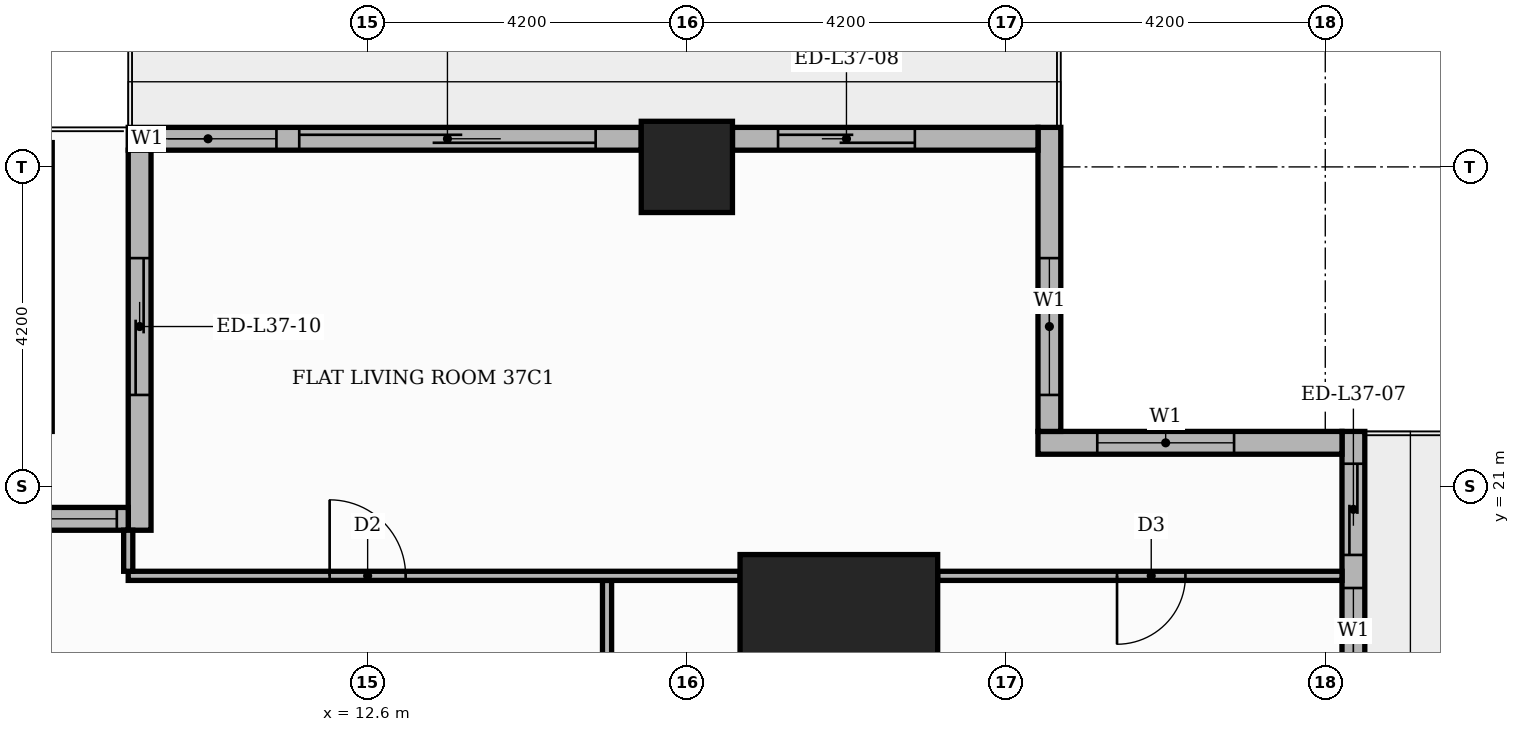
"""IFC4 building model, lengths in metres.
Left out: names, types, materials, properties, quantities, classifications, styles, units other than length and angle.
Written with IfcOpenShell. Run it as: python <this file> out.ifc"""

import sys

from ifc_helpers import new_model, si_unit, direction, frame, frame_2d, origin, origin_2d, place, context, subcontext, project, spatial, rectangle, extrude, element, fill, save


model = new_model("IFC4")
c1 = context("Model", 3, precision=1e-05, world=origin(), true_north=direction((0.0, 1.0)))
c2 = subcontext(c1, "Body", "Model", "MODEL_VIEW")
j1 = project(units=[si_unit("LENGTHUNIT", "METRE"), si_unit("PLANEANGLEUNIT", "RADIAN")], contexts=[c1])
p1 = place(None, origin())
s1 = spatial("IfcSite", under=j1, at=p1, CompositionType="ELEMENT")
p2 = place(p1, origin())
s2 = spatial("IfcBuilding", under=s1, at=p2, CompositionType="ELEMENT")
p3 = place(p2, frame((0.0, 0.0, 157.2)))
s3 = spatial("IfcBuildingStorey", under=s2, at=p3, CompositionType="ELEMENT", Elevation=157.2)
p4 = place(p3, frame((18.8, 18.8, 0.0), z_axis=(0.0, 0.0, 1.0), x_axis=(1.0, 0.0, 0.0)))
e1 = element("IfcColumn", 1, at=p4, inside=s3, PredefinedType="COLUMN", context=c2, shape_type="SweptSolid", body=[
    extrude(rectangle(XDim=2.6, YDim=2.6, at=origin_2d()), origin(), (0.0, 0.0, 1.0), 3.9),
])
p5 = place(p3, frame((16.8, 25.2, 0.0), z_axis=(0.0, 0.0, 1.0), x_axis=(1.0, 0.0, 0.0)))
e2 = element("IfcColumn", 2, at=p5, inside=s3, PredefinedType="COLUMN", context=c2, shape_type="SweptSolid", body=[
    extrude(rectangle(XDim=1.2, YDim=1.2, at=origin_2d()), origin(), (0.0, 0.0, 1.0), 3.9),
])
p6 = place(p3, frame((25.57, 17.4, 0.0), z_axis=(0.0, 0.0, 1.0), x_axis=(0.0, 1.0, 0.0)))
e3 = element("IfcWall", 3, at=p6, inside=s3, PredefinedType="STANDARD", context=c2, shape_type="SweptSolid", body=[
    extrude(rectangle(XDim=4.32, YDim=0.3, at=frame_2d((2.16, 0.0))), origin(), (0.0, 0.0, 1.0), 3.48),
])
p7 = place(p6, frame((2.695, 0.0, 0.0)))
e4 = element("IfcOpeningElement", 4, at=p7, cuts=e3, PredefinedType="OPENING", context=c2, shape_type="SweptSolid", body=[
    extrude(rectangle(XDim=1.2, YDim=2.4, at=frame_2d((0.6, 1.2))), frame((0.0, 0.16, 0.0), z_axis=(0.0, -1.0, 0.0), x_axis=(1.0, 0.0, 0.0)), (0.0, 0.0, 1.0), 0.32),
])
p8 = place(p6, frame((0.46, 0.0, 0.9)))
e5 = element("IfcOpeningElement", 5, at=p8, cuts=e3, PredefinedType="OPENING", context=c2, shape_type="SweptSolid", body=[
    extrude(rectangle(XDim=1.8, YDim=2.1, at=frame_2d((0.9, 1.05))), frame((0.0, 0.16, 0.0), z_axis=(0.0, -1.0, 0.0), x_axis=(1.0, 0.0, 0.0)), (0.0, 0.0, 1.0), 0.32),
])
p9 = place(p3, frame((25.42, 21.57, 0.0), z_axis=(0.0, 0.0, 1.0), x_axis=(-1.0, 0.0, 0.0)))
e6 = element("IfcWall", 6, at=p9, inside=s3, PredefinedType="STANDARD", context=c2, shape_type="SweptSolid", body=[
    extrude(rectangle(XDim=4.0, YDim=0.3, at=frame_2d((2.0, 0.0))), origin(), (0.0, 0.0, 1.0), 3.48),
])
p10 = place(p9, frame((1.42, 0.0, 0.9)))
e7 = element("IfcOpeningElement", 7, at=p10, cuts=e6, PredefinedType="OPENING", context=c2, shape_type="SweptSolid", body=[
    extrude(rectangle(XDim=1.8, YDim=2.1, at=frame_2d((0.9, 1.05))), frame((0.0, 0.16, 0.0), z_axis=(0.0, -1.0, 0.0), x_axis=(1.0, 0.0, 0.0)), (0.0, 0.0, 1.0), 0.32),
])
p11 = place(p3, frame((21.57, 21.72, 0.0), z_axis=(0.0, 0.0, 1.0), x_axis=(0.0, 1.0, 0.0)))
e8 = element("IfcWall", 8, at=p11, inside=s3, PredefinedType="STANDARD", context=c2, shape_type="SweptSolid", body=[
    extrude(rectangle(XDim=4.0, YDim=0.3, at=frame_2d((2.0, 0.0))), origin(), (0.0, 0.0, 1.0), 3.48),
])
p12 = place(p11, frame((0.48, 0.0, 0.9)))
e9 = element("IfcOpeningElement", 9, at=p12, cuts=e8, PredefinedType="OPENING", context=c2, shape_type="SweptSolid", body=[
    extrude(rectangle(XDim=1.8, YDim=2.1, at=frame_2d((0.9, 1.05))), frame((0.0, 0.16, 0.0), z_axis=(0.0, -1.0, 0.0), x_axis=(1.0, 0.0, 0.0)), (0.0, 0.0, 1.0), 0.32),
])
p13 = place(p3, frame((21.42, 25.57, 0.0), z_axis=(0.0, 0.0, 1.0), x_axis=(-1.0, 0.0, 0.0)))
e10 = element("IfcWall", 10, at=p13, inside=s3, PredefinedType="STANDARD", context=c2, shape_type="SweptSolid", body=[
    extrude(rectangle(XDim=4.02, YDim=0.3, at=frame_2d((2.01, 0.0))), origin(), (0.0, 0.0, 1.0), 3.48),
])
p14 = place(p13, frame((1.62, 0.0, 0.0)))
e11 = element("IfcOpeningElement", 11, at=p14, cuts=e10, PredefinedType="OPENING", context=c2, shape_type="SweptSolid", body=[
    extrude(rectangle(XDim=1.8, YDim=2.4, at=frame_2d((0.9, 1.2))), frame((0.0, 0.16, 0.0), z_axis=(0.0, -1.0, 0.0), x_axis=(1.0, 0.0, 0.0)), (0.0, 0.0, 1.0), 0.32),
])
p15 = place(p3, frame((16.2, 25.57, 0.0), z_axis=(0.0, 0.0, 1.0), x_axis=(-1.0, 0.0, 0.0)))
e12 = element("IfcWall", 12, at=p15, inside=s3, PredefinedType="STANDARD", context=c2, shape_type="SweptSolid", body=[
    extrude(rectangle(XDim=6.75, YDim=0.3, at=frame_2d((3.375, 0.0))), origin(), (0.0, 0.0, 1.0), 3.48),
])
p16 = place(p15, frame((0.6, 0.0, 0.0)))
e13 = element("IfcOpeningElement", 13, at=p16, cuts=e12, PredefinedType="OPENING", context=c2, shape_type="SweptSolid", body=[
    extrude(rectangle(XDim=3.9, YDim=2.4, at=frame_2d((1.95, 1.2))), frame((0.0, 0.16, 0.0), z_axis=(0.0, -1.0, 0.0), x_axis=(1.0, 0.0, 0.0)), (0.0, 0.0, 1.0), 0.32),
])
p17 = place(p15, frame((4.8, 0.0, 0.9)))
e14 = element("IfcOpeningElement", 14, at=p17, cuts=e12, PredefinedType="OPENING", context=c2, shape_type="SweptSolid", body=[
    extrude(rectangle(XDim=1.8, YDim=2.1, at=frame_2d((0.9, 1.05))), frame((0.0, 0.16, 0.0), z_axis=(0.0, -1.0, 0.0), x_axis=(1.0, 0.0, 0.0)), (0.0, 0.0, 1.0), 0.32),
])
p18 = place(p3, frame((9.6, 25.42, 0.0), z_axis=(0.0, 0.0, 1.0), x_axis=(0.0, -1.0, 0.0)))
e15 = element("IfcWall", 15, at=p18, inside=s3, PredefinedType="STANDARD", context=c2, shape_type="SweptSolid", body=[
    extrude(rectangle(XDim=5.0, YDim=0.3, at=frame_2d((2.5, 0.0))), origin(), (0.0, 0.0, 1.0), 3.48),
])
p19 = place(p18, frame((1.42, 0.0, 0.0)))
e16 = element("IfcOpeningElement", 16, at=p19, cuts=e15, PredefinedType="OPENING", context=c2, shape_type="SweptSolid", body=[
    extrude(rectangle(XDim=1.8, YDim=2.4, at=frame_2d((0.9, 1.2))), frame((0.0, 0.16, 0.0), z_axis=(0.0, -1.0, 0.0), x_axis=(1.0, 0.0, 0.0)), (0.0, 0.0, 1.0), 0.32),
])
p20 = place(p3, frame((9.45, 20.57, 0.0), z_axis=(0.0, 0.0, 1.0), x_axis=(-1.0, 0.0, 0.0)))
e17 = element("IfcWall", 17, at=p20, inside=s3, PredefinedType="STANDARD", context=c2, shape_type="SweptSolid", body=[
    extrude(rectangle(XDim=19.2, YDim=0.3, at=frame_2d((9.6, 0.0))), origin(), (0.0, 0.0, 1.0), 3.48),
])
p21 = place(p20, frame((0.15, 0.0, 0.9)))
e18 = element("IfcOpeningElement", 18, at=p21, cuts=e17, PredefinedType="OPENING", context=c2, shape_type="SweptSolid", body=[
    extrude(rectangle(XDim=3.9, YDim=2.1, at=frame_2d((1.95, 1.05))), frame((0.0, 0.16, 0.0), z_axis=(0.0, -1.0, 0.0), x_axis=(1.0, 0.0, 0.0)), (0.0, 0.0, 1.0), 0.32),
])
p22 = place(p20, frame((4.35, 0.0, 0.9)))
e19 = element("IfcOpeningElement", 19, at=p22, cuts=e17, PredefinedType="OPENING", context=c2, shape_type="SweptSolid", body=[
    extrude(rectangle(XDim=6.0, YDim=2.1, at=frame_2d((3.0, 1.05))), frame((0.0, 0.16, 0.0), z_axis=(0.0, -1.0, 0.0), x_axis=(1.0, 0.0, 0.0)), (0.0, 0.0, 1.0), 0.32),
])
p23 = place(p20, frame((10.65, 0.0, 0.9)))
e20 = element("IfcOpeningElement", 20, at=p23, cuts=e17, PredefinedType="OPENING", context=c2, shape_type="SweptSolid", body=[
    extrude(rectangle(XDim=6.0, YDim=2.1, at=frame_2d((3.0, 1.05))), frame((0.0, 0.16, 0.0), z_axis=(0.0, -1.0, 0.0), x_axis=(1.0, 0.0, 0.0)), (0.0, 0.0, 1.0), 0.32),
])
p24 = place(p20, frame((16.95, 0.0, 0.9)))
e21 = element("IfcOpeningElement", 21, at=p24, cuts=e17, PredefinedType="OPENING", context=c2, shape_type="SweptSolid", body=[
    extrude(rectangle(XDim=1.8, YDim=2.1, at=frame_2d((0.9, 1.05))), frame((0.0, 0.16, 0.0), z_axis=(0.0, -1.0, 0.0), x_axis=(1.0, 0.0, 0.0)), (0.0, 0.0, 1.0), 0.32),
])
p25 = place(p3, frame((15.75, 13.75, 0.0), z_axis=(0.0, 0.0, 1.0), x_axis=(0.0, 1.0, 0.0)))
e22 = element("IfcWall", 22, at=p25, inside=s3, PredefinedType="PARTITIONING", context=c2, shape_type="SweptSolid", body=[
    extrude(rectangle(XDim=6.01, YDim=0.12, at=frame_2d((3.005, 0.0))), origin(), (0.0, 0.0, 1.0), 3.48),
])
p26 = place(p25, frame((2.485, 0.0, 0.0)))
e23 = element("IfcOpeningElement", 23, at=p26, cuts=e22, PredefinedType="OPENING", context=c2, shape_type="SweptSolid", body=[
    extrude(rectangle(XDim=1.0, YDim=2.1, at=frame_2d((0.5, 1.05))), frame((0.0, 0.07, 0.0), z_axis=(0.0, -1.0, 0.0), x_axis=(1.0, 0.0, 0.0)), (0.0, 0.0, 1.0), 0.14),
])
p27 = place(p3, frame((9.45, 19.82, 0.0), z_axis=(0.0, 0.0, 1.0), x_axis=(1.0, 0.0, 0.0)))
e24 = element("IfcWall", 24, at=p27, inside=s3, PredefinedType="PARTITIONING", context=c2, shape_type="SweptSolid", body=[
    extrude(rectangle(XDim=8.05, YDim=0.12, at=frame_2d((4.025, 0.0))), origin(), (0.0, 0.0, 1.0), 3.48),
])
p28 = place(p27, frame((2.65, 0.0, 0.0)))
e25 = element("IfcOpeningElement", 25, at=p28, cuts=e24, PredefinedType="OPENING", context=c2, shape_type="SweptSolid", body=[
    extrude(rectangle(XDim=1.0, YDim=2.1, at=frame_2d((0.5, 1.05))), frame((0.0, 0.07, 0.0), z_axis=(0.0, -1.0, 0.0), x_axis=(1.0, 0.0, 0.0)), (0.0, 0.0, 1.0), 0.14),
])
p29 = place(p3, frame((20.1, 19.82, 0.0), z_axis=(0.0, 0.0, 1.0), x_axis=(1.0, 0.0, 0.0)))
e26 = element("IfcWall", 26, at=p29, inside=s3, PredefinedType="PARTITIONING", context=c2, shape_type="SweptSolid", body=[
    extrude(rectangle(XDim=5.32, YDim=0.12, at=frame_2d((2.66, 0.0))), origin(), (0.0, 0.0, 1.0), 3.48),
])
p30 = place(p29, frame((2.36, 0.0, 0.0)))
e27 = element("IfcOpeningElement", 27, at=p30, cuts=e26, PredefinedType="OPENING", context=c2, shape_type="SweptSolid", body=[
    extrude(rectangle(XDim=0.9, YDim=2.1, at=frame_2d((0.45, 1.05))), frame((0.0, 0.07, 0.0), z_axis=(0.0, -1.0, 0.0), x_axis=(1.0, 0.0, 0.0)), (0.0, 0.0, 1.0), 0.14),
])
p31 = place(p3, frame((9.45, 19.88, 0.0), z_axis=(0.0, 0.0, 1.0), x_axis=(0.0, 1.0, 0.0)))
e28 = element("IfcWall", 28, at=p31, inside=s3, PredefinedType="PARTITIONING", context=c2, shape_type="SweptSolid", body=[
    extrude(rectangle(XDim=0.54, YDim=0.12, at=frame_2d((0.27, 0.0))), origin(), (0.0, 0.0, 1.0), 3.48),
])
p32 = place(p7, origin())
e29 = element("IfcDoor", 29, at=p32, inside=s3, OperationType="SLIDING_TO_LEFT", PredefinedType="DOOR", context=c2, shape_type="SweptSolid", body=[
    extrude(rectangle(XDim=1.2, YDim=2.4, at=frame_2d((0.6, 1.2))), frame((0.0, 0.025, 0.0), z_axis=(0.0, -1.0, 0.0), x_axis=(1.0, 0.0, 0.0)), (0.0, 0.0, 1.0), 0.05),
])
fill(e4, e29)
p33 = place(p8, origin())
e30 = element("IfcWindow", 30, at=p33, inside=s3, PartitioningType="SINGLE_PANEL", PredefinedType="WINDOW", context=c2, shape_type="SweptSolid", body=[
    extrude(rectangle(XDim=1.8, YDim=2.1, at=frame_2d((0.9, 1.05))), frame((0.0, 0.03, 0.0), z_axis=(0.0, -1.0, 0.0), x_axis=(1.0, 0.0, 0.0)), (0.0, 0.0, 1.0), 0.06),
])
fill(e5, e30)
p34 = place(p10, origin())
e31 = element("IfcWindow", 31, at=p34, inside=s3, PartitioningType="SINGLE_PANEL", PredefinedType="WINDOW", context=c2, shape_type="SweptSolid", body=[
    extrude(rectangle(XDim=1.8, YDim=2.1, at=frame_2d((0.9, 1.05))), frame((0.0, 0.03, 0.0), z_axis=(0.0, -1.0, 0.0), x_axis=(1.0, 0.0, 0.0)), (0.0, 0.0, 1.0), 0.06),
])
fill(e7, e31)
p35 = place(p12, origin())
e32 = element("IfcWindow", 32, at=p35, inside=s3, PartitioningType="SINGLE_PANEL", PredefinedType="WINDOW", context=c2, shape_type="SweptSolid", body=[
    extrude(rectangle(XDim=1.8, YDim=2.1, at=frame_2d((0.9, 1.05))), frame((0.0, 0.03, 0.0), z_axis=(0.0, -1.0, 0.0), x_axis=(1.0, 0.0, 0.0)), (0.0, 0.0, 1.0), 0.06),
])
fill(e9, e32)
p36 = place(p14, origin())
e33 = element("IfcDoor", 33, at=p36, inside=s3, OperationType="SLIDING_TO_RIGHT", PredefinedType="DOOR", context=c2, shape_type="SweptSolid", body=[
    extrude(rectangle(XDim=1.8, YDim=2.4, at=frame_2d((0.9, 1.2))), frame((0.0, 0.025, 0.0), z_axis=(0.0, -1.0, 0.0), x_axis=(1.0, 0.0, 0.0)), (0.0, 0.0, 1.0), 0.05),
])
fill(e11, e33)
p37 = place(p16, origin())
e34 = element("IfcDoor", 34, at=p37, inside=s3, OperationType="SLIDING_TO_LEFT", PredefinedType="DOOR", context=c2, shape_type="SweptSolid", body=[
    extrude(rectangle(XDim=3.9, YDim=2.4, at=frame_2d((1.95, 1.2))), frame((0.0, 0.025, 0.0), z_axis=(0.0, -1.0, 0.0), x_axis=(1.0, 0.0, 0.0)), (0.0, 0.0, 1.0), 0.05),
])
fill(e13, e34)
p38 = place(p17, origin())
e35 = element("IfcWindow", 35, at=p38, inside=s3, PartitioningType="SINGLE_PANEL", PredefinedType="WINDOW", context=c2, shape_type="SweptSolid", body=[
    extrude(rectangle(XDim=1.8, YDim=2.1, at=frame_2d((0.9, 1.05))), frame((0.0, 0.03, 0.0), z_axis=(0.0, -1.0, 0.0), x_axis=(1.0, 0.0, 0.0)), (0.0, 0.0, 1.0), 0.06),
])
fill(e14, e35)
p39 = place(p19, origin())
e36 = element("IfcDoor", 36, at=p39, inside=s3, OperationType="SLIDING_TO_LEFT", PredefinedType="DOOR", context=c2, shape_type="SweptSolid", body=[
    extrude(rectangle(XDim=1.8, YDim=2.4, at=frame_2d((0.9, 1.2))), frame((0.0, 0.025, 0.0), z_axis=(0.0, -1.0, 0.0), x_axis=(1.0, 0.0, 0.0)), (0.0, 0.0, 1.0), 0.05),
])
fill(e16, e36)
p40 = place(p21, origin())
e37 = element("IfcWindow", 37, at=p40, inside=s3, PartitioningType="SINGLE_PANEL", PredefinedType="WINDOW", context=c2, shape_type="SweptSolid", body=[
    extrude(rectangle(XDim=3.9, YDim=2.1, at=frame_2d((1.95, 1.05))), frame((0.0, 0.03, 0.0), z_axis=(0.0, -1.0, 0.0), x_axis=(1.0, 0.0, 0.0)), (0.0, 0.0, 1.0), 0.06),
])
fill(e18, e37)
p41 = place(p30, frame((0.9, 0.0, 0.0), z_axis=(0.0, 0.0, 1.0), x_axis=(-1.0, 0.0, 0.0)))
e38 = element("IfcDoor", 38, at=p41, inside=s3, OperationType="SINGLE_SWING_LEFT", PredefinedType="DOOR", context=c2, shape_type="SweptSolid", body=[
    extrude(rectangle(XDim=0.9, YDim=2.1, at=frame_2d((0.45, 1.05))), frame((0.0, 0.025, 0.0), z_axis=(0.0, -1.0, 0.0), x_axis=(1.0, 0.0, 0.0)), (0.0, 0.0, 1.0), 0.05),
])
fill(e27, e38)
p42 = place(p28, origin())
e39 = element("IfcDoor", 39, at=p42, inside=s3, OperationType="SINGLE_SWING_LEFT", PredefinedType="DOOR", context=c2, shape_type="SweptSolid", body=[
    extrude(rectangle(XDim=1.0, YDim=2.1, at=frame_2d((0.5, 1.05))), frame((0.0, 0.025, 0.0), z_axis=(0.0, -1.0, 0.0), x_axis=(1.0, 0.0, 0.0)), (0.0, 0.0, 1.0), 0.05),
])
fill(e25, e39)
save(model, sys.argv[1])
